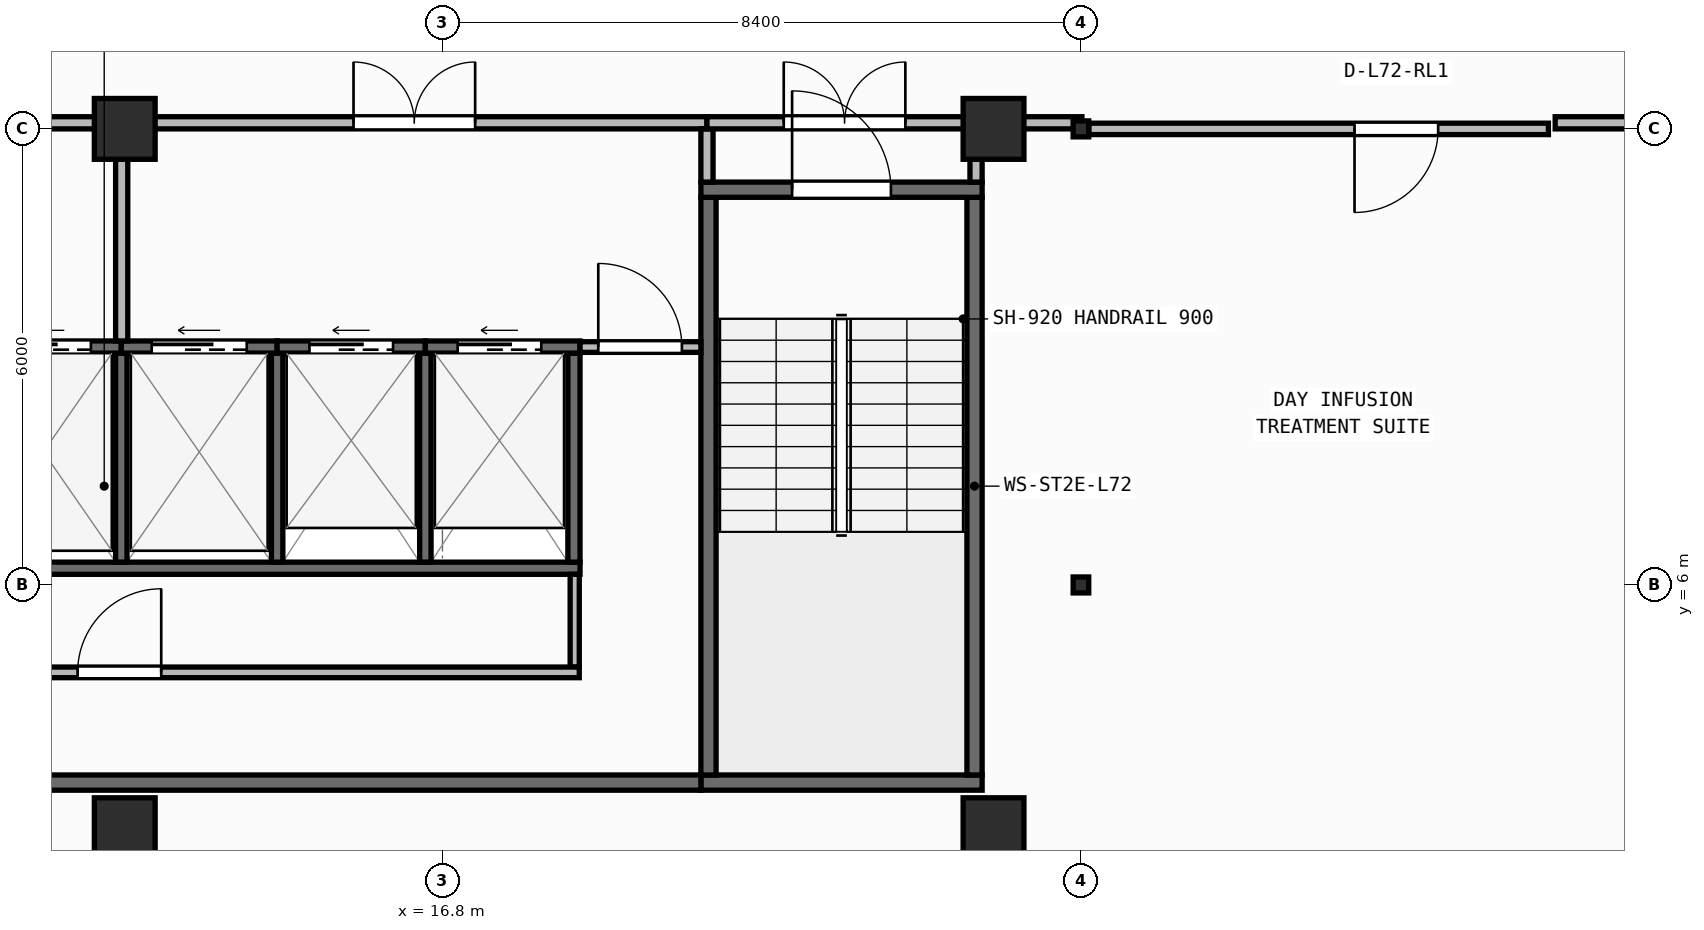
"""IFC4 building model, lengths in metres.
Left out: names, types, materials, properties, quantities, classifications, styles, units other than length and angle.
Written with IfcOpenShell. Run it as: python <this file> out.ifc"""

import sys

from ifc_helpers import new_model, si_unit, direction, frame, frame_2d, origin, origin_2d, place, context, subcontext, project, spatial, rectangle, i_section, extrude, element, fill, save


model = new_model("IFC4")
c1 = context("Model", 3, precision=1e-05, world=origin(), true_north=direction((0.0, 1.0)))
c2 = subcontext(c1, "Body", "Model", "MODEL_VIEW")
j1 = project(units=[si_unit("LENGTHUNIT", "METRE"), si_unit("PLANEANGLEUNIT", "RADIAN")], contexts=[c1])
p1 = place(None, origin())
s1 = spatial("IfcSite", under=j1, at=p1, CompositionType="ELEMENT")
p2 = place(p1, origin())
s2 = spatial("IfcBuilding", under=s1, at=p2, CompositionType="ELEMENT")
p3 = place(p2, frame((0.0, 0.0, 292.1)))
s3 = spatial("IfcBuildingStorey", under=s2, at=p3, CompositionType="ELEMENT", Elevation=292.1)
for number, where, z_axis, x_axis in (
    (1, (12.62, 2.8, 0.0), (0.0, 0.0, 1.0), (1.0, 0.0, 0.0)),
    (2, (24.05, 2.8, 0.0), (0.0, 0.0, 1.0), (1.0, 0.0, 0.0)),
):
    element("IfcColumn", number, at=place(p3, frame(where, z_axis=z_axis, x_axis=x_axis)), inside=s3, PredefinedType="COLUMN", context=c2, shape_type="SweptSolid", body=[
        extrude(rectangle(XDim=0.8, YDim=0.8, at=origin_2d()), origin(), (0.0, 0.0, 1.0), 3.95),
    ])
p4 = place(p3, frame((25.2, 6.0, 0.0), z_axis=(0.0, 0.0, 1.0), x_axis=(1.0, 0.0, 0.0)))
e3 = element("IfcColumn", 3, at=p4, inside=s3, PredefinedType="COLUMN", context=c2, shape_type="SweptSolid", body=[
    extrude(i_section(OverallWidth=0.205, OverallDepth=0.21, WebThickness=0.009, FlangeThickness=0.014, FilletRadius=0.011, at=origin_2d()), origin(), (0.0, 0.0, 1.0), 3.95),
])
for number, where, z_axis, x_axis in (
    (4, (12.62, 12.0, 0.0), (0.0, 0.0, 1.0), (1.0, 0.0, 0.0)),
    (5, (24.05, 12.0, 0.0), (0.0, 0.0, 1.0), (1.0, 0.0, 0.0)),
):
    element("IfcColumn", number, at=place(p3, frame(where, z_axis=z_axis, x_axis=x_axis)), inside=s3, PredefinedType="COLUMN", context=c2, shape_type="SweptSolid", body=[
        extrude(rectangle(XDim=0.8, YDim=0.8, at=origin_2d()), origin(), (0.0, 0.0, 1.0), 3.95),
    ])
p5 = place(p3, frame((25.2, 12.0, 0.0), z_axis=(0.0, 0.0, 1.0), x_axis=(1.0, 0.0, 0.0)))
e6 = element("IfcColumn", 6, at=p5, inside=s3, PredefinedType="COLUMN", context=c2, shape_type="SweptSolid", body=[
    extrude(i_section(OverallWidth=0.205, OverallDepth=0.21, WebThickness=0.009, FlangeThickness=0.014, FilletRadius=0.011, at=origin_2d()), origin(), (0.0, 0.0, 1.0), 3.95),
])
p6 = place(p3, frame((2.46, 0.171, 0.0), z_axis=(0.0, 0.0, 1.0), x_axis=(0.997760665813, 0.066885377746, 0.0)))
e7 = element("IfcWall", 7, at=p6, inside=s3, PredefinedType="STANDARD", context=c2, shape_type="SweptSolid", body=[
    extrude(rectangle(XDim=35.56, YDim=0.26, at=frame_2d((17.78, 0.0))), origin(), (0.0, 0.0, 1.0), 3.71),
])
p7 = place(p6, frame((16.58, 0.0, 0.9)))
e8 = element("IfcOpeningElement", 8, at=p7, cuts=e7, PredefinedType="OPENING", context=c2, shape_type="SweptSolid", body=[
    extrude(rectangle(XDim=2.4, YDim=1.65, at=frame_2d((1.2, 0.825))), frame((0.0, 0.14, 0.0), z_axis=(0.0, -1.0, 0.0), x_axis=(1.0, 0.0, 0.0)), (0.0, 0.0, 1.0), 0.28),
])
p8 = place(p3, frame((20.2, 3.4, 0.0), z_axis=(0.0, 0.0, 1.0), x_axis=(1.0, 0.0, 0.0)))
e9 = element("IfcWall", 9, at=p8, inside=s3, PredefinedType="SHEAR", context=c2, shape_type="SweptSolid", body=[
    extrude(rectangle(XDim=3.7, YDim=0.2, at=frame_2d((1.85, 0.0))), origin(), (0.0, 0.0, 1.0), 3.71),
])
for number, where, z_axis, x_axis in (
    (10, (20.3, 3.5, 0.0), (0.0, 0.0, 1.0), (0.0, 1.0, 0.0)),
    (11, (23.8, 3.5, 0.0), (0.0, 0.0, 1.0), (0.0, 1.0, 0.0)),
):
    element("IfcWall", number, at=place(p3, frame(where, z_axis=z_axis, x_axis=x_axis)), inside=s3, PredefinedType="SHEAR", context=c2, shape_type="SweptSolid", body=[
        extrude(rectangle(XDim=7.6, YDim=0.2, at=frame_2d((3.8, 0.0))), origin(), (0.0, 0.0, 1.0), 3.71),
    ])
p9 = place(p3, frame((20.2, 11.2, 0.0), z_axis=(0.0, 0.0, 1.0), x_axis=(1.0, 0.0, 0.0)))
e12 = element("IfcWall", 12, at=p9, inside=s3, PredefinedType="SHEAR", context=c2, shape_type="SweptSolid", body=[
    extrude(rectangle(XDim=3.7, YDim=0.2, at=frame_2d((1.85, 0.0))), origin(), (0.0, 0.0, 1.0), 3.71),
])
p10 = place(p9, frame((1.2, 0.0, 0.0)))
e13 = element("IfcOpeningElement", 13, at=p10, cuts=e12, PredefinedType="OPENING", context=c2, shape_type="SweptSolid", body=[
    extrude(rectangle(XDim=1.3, YDim=2.15, at=frame_2d((0.65, 1.075))), frame((0.0, 0.11, 0.0), z_axis=(0.0, -1.0, 0.0), x_axis=(1.0, 0.0, 0.0)), (0.0, 0.0, 1.0), 0.22),
])
p11 = place(p3, frame((6.5, 3.4, 0.0), z_axis=(0.0, 0.0, 1.0), x_axis=(1.0, 0.0, 0.0)))
e14 = element("IfcWall", 14, at=p11, inside=s3, PredefinedType="SHEAR", context=c2, shape_type="SweptSolid", body=[
    extrude(rectangle(XDim=13.7, YDim=0.2, at=frame_2d((6.85, 0.0))), origin(), (0.0, 0.0, 1.0), 3.71),
])
p12 = place(p3, frame((6.5, 6.22, 0.0), z_axis=(0.0, 0.0, 1.0), x_axis=(1.0, 0.0, 0.0)))
e15 = element("IfcWall", 15, at=p12, inside=s3, PredefinedType="SHEAR", context=c2, shape_type="SweptSolid", body=[
    extrude(rectangle(XDim=12.11, YDim=0.16, at=frame_2d((6.055, 0.0))), origin(), (0.0, 0.0, 1.0), 3.71),
])
p13 = place(p3, frame((18.53, 6.3, 0.0), z_axis=(0.0, 0.0, 1.0), x_axis=(0.0, 1.0, 0.0)))
e16 = element("IfcWall", 16, at=p13, inside=s3, PredefinedType="SHEAR", context=c2, shape_type="SweptSolid", body=[
    extrude(rectangle(XDim=2.75, YDim=0.16, at=frame_2d((1.375, 0.0))), origin(), (0.0, 0.0, 1.0), 3.71),
])
for number, where, z_axis, x_axis in (
    (17, (12.575, 6.3, 0.0), (0.0, 0.0, 1.0), (0.0, 1.0, 0.0)),
    (18, (14.625, 6.3, 0.0), (0.0, 0.0, 1.0), (0.0, 1.0, 0.0)),
    (19, (16.575, 6.3, 0.0), (0.0, 0.0, 1.0), (0.0, 1.0, 0.0)),
):
    element("IfcWall", number, at=place(p3, frame(where, z_axis=z_axis, x_axis=x_axis)), inside=s3, PredefinedType="SHEAR", context=c2, shape_type="SweptSolid", body=[
        extrude(rectangle(XDim=2.75, YDim=0.15, at=frame_2d((1.375, 0.0))), origin(), (0.0, 0.0, 1.0), 3.71),
    ])
p14 = place(p3, frame((10.525, 9.13, 0.0), z_axis=(0.0, 0.0, 1.0), x_axis=(1.0, 0.0, 0.0)))
e20 = element("IfcWall", 20, at=p14, inside=s3, PredefinedType="SHEAR", context=c2, shape_type="SweptSolid", body=[
    extrude(rectangle(XDim=2.05, YDim=0.16, at=frame_2d((1.025, 0.0))), origin(), (0.0, 0.0, 1.0), 3.71),
])
p15 = place(p14, frame((0.4, 0.0, 0.0)))
e21 = element("IfcOpeningElement", 21, at=p15, cuts=e20, PredefinedType="OPENING", context=c2, shape_type="SweptSolid", body=[
    extrude(rectangle(XDim=1.25, YDim=2.15, at=frame_2d((0.625, 1.075))), frame((0.0, 0.09, 0.0), z_axis=(0.0, -1.0, 0.0), x_axis=(1.0, 0.0, 0.0)), (0.0, 0.0, 1.0), 0.18),
])
p16 = place(p3, frame((12.575, 9.13, 0.0), z_axis=(0.0, 0.0, 1.0), x_axis=(1.0, 0.0, 0.0)))
e22 = element("IfcWall", 22, at=p16, inside=s3, PredefinedType="SHEAR", context=c2, shape_type="SweptSolid", body=[
    extrude(rectangle(XDim=2.05, YDim=0.16, at=frame_2d((1.025, 0.0))), origin(), (0.0, 0.0, 1.0), 3.71),
])
p17 = place(p16, frame((0.4, 0.0, 0.0)))
e23 = element("IfcOpeningElement", 23, at=p17, cuts=e22, PredefinedType="OPENING", context=c2, shape_type="SweptSolid", body=[
    extrude(rectangle(XDim=1.25, YDim=2.15, at=frame_2d((0.625, 1.075))), frame((0.0, 0.09, 0.0), z_axis=(0.0, -1.0, 0.0), x_axis=(1.0, 0.0, 0.0)), (0.0, 0.0, 1.0), 0.18),
])
p18 = place(p3, frame((14.625, 9.13, 0.0), z_axis=(0.0, 0.0, 1.0), x_axis=(1.0, 0.0, 0.0)))
e24 = element("IfcWall", 24, at=p18, inside=s3, PredefinedType="SHEAR", context=c2, shape_type="SweptSolid", body=[
    extrude(rectangle(XDim=1.95, YDim=0.16, at=frame_2d((0.975, 0.0))), origin(), (0.0, 0.0, 1.0), 3.71),
])
p19 = place(p18, frame((0.425, 0.0, 0.0)))
e25 = element("IfcOpeningElement", 25, at=p19, cuts=e24, PredefinedType="OPENING", context=c2, shape_type="SweptSolid", body=[
    extrude(rectangle(XDim=1.1, YDim=2.15, at=frame_2d((0.55, 1.075))), frame((0.0, 0.09, 0.0), z_axis=(0.0, -1.0, 0.0), x_axis=(1.0, 0.0, 0.0)), (0.0, 0.0, 1.0), 0.18),
])
p20 = place(p3, frame((16.575, 9.13, 0.0), z_axis=(0.0, 0.0, 1.0), x_axis=(1.0, 0.0, 0.0)))
e26 = element("IfcWall", 26, at=p20, inside=s3, PredefinedType="SHEAR", context=c2, shape_type="SweptSolid", body=[
    extrude(rectangle(XDim=2.035, YDim=0.16, at=frame_2d((1.018, 0.0))), origin(), (0.0, 0.0, 1.0), 3.71),
])
p21 = place(p20, frame((0.425, 0.0, 0.0)))
e27 = element("IfcOpeningElement", 27, at=p21, cuts=e26, PredefinedType="OPENING", context=c2, shape_type="SweptSolid", body=[
    extrude(rectangle(XDim=1.1, YDim=2.15, at=frame_2d((0.55, 1.075))), frame((0.0, 0.09, 0.0), z_axis=(0.0, -1.0, 0.0), x_axis=(1.0, 0.0, 0.0)), (0.0, 0.0, 1.0), 0.18),
])
p22 = place(p3, frame((18.54, 4.92, 0.0), z_axis=(0.0, 0.0, 1.0), x_axis=(0.0, 1.0, 0.0)))
e28 = element("IfcWall", 28, at=p22, inside=s3, PredefinedType="PARTITIONING", context=c2, shape_type="SweptSolid", body=[
    extrude(rectangle(XDim=1.22, YDim=0.12, at=frame_2d((0.61, 0.0))), origin(), (0.0, 0.0, 1.0), 3.71),
])
p23 = place(p3, frame((6.5, 4.85, 0.0), z_axis=(0.0, 0.0, 1.0), x_axis=(1.0, 0.0, 0.0)))
e29 = element("IfcWall", 29, at=p23, inside=s3, PredefinedType="PARTITIONING", context=c2, shape_type="SweptSolid", body=[
    extrude(rectangle(XDim=12.1, YDim=0.14, at=frame_2d((6.05, 0.0))), origin(), (0.0, 0.0, 1.0), 3.71),
])
p24 = place(p23, frame((5.5, 0.0, 0.0)))
e30 = element("IfcOpeningElement", 30, at=p24, cuts=e29, PredefinedType="OPENING", context=c2, shape_type="SweptSolid", body=[
    extrude(rectangle(XDim=1.1, YDim=2.1, at=frame_2d((0.55, 1.05))), frame((0.0, 0.08, 0.0), z_axis=(0.0, -1.0, 0.0), x_axis=(1.0, 0.0, 0.0)), (0.0, 0.0, 1.0), 0.16),
])
p25 = place(p3, frame((18.61, 9.13, 0.0), z_axis=(0.0, 0.0, 1.0), x_axis=(1.0, 0.0, 0.0)))
e31 = element("IfcWall", 31, at=p25, inside=s3, PredefinedType="PARTITIONING", context=c2, shape_type="SweptSolid", body=[
    extrude(rectangle(XDim=1.59, YDim=0.14, at=frame_2d((0.795, 0.0))), origin(), (0.0, 0.0, 1.0), 3.71),
])
p26 = place(p25, frame((0.24, 0.0, 0.0)))
e32 = element("IfcOpeningElement", 32, at=p26, cuts=e31, PredefinedType="OPENING", context=c2, shape_type="SweptSolid", body=[
    extrude(rectangle(XDim=1.1, YDim=2.1, at=frame_2d((0.55, 1.05))), frame((0.0, 0.08, 0.0), z_axis=(0.0, -1.0, 0.0), x_axis=(1.0, 0.0, 0.0)), (0.0, 0.0, 1.0), 0.16),
])
p27 = place(p3, frame((6.4, 12.08, 0.0), z_axis=(0.0, 0.0, 1.0), x_axis=(1.0, 0.0, 0.0)))
e33 = element("IfcWall", 33, at=p27, inside=s3, PredefinedType="PARTITIONING", context=c2, shape_type="SweptSolid", body=[
    extrude(rectangle(XDim=6.18, YDim=0.16, at=frame_2d((3.09, 0.0))), origin(), (0.0, 0.0, 1.0), 3.157),
])
p28 = place(p27, frame((2.29, 0.0, 0.0)))
e34 = element("IfcOpeningElement", 34, at=p28, cuts=e33, PredefinedType="OPENING", context=c2, shape_type="SweptSolid", body=[
    extrude(rectangle(XDim=1.6, YDim=2.05, at=frame_2d((0.8, 1.025))), frame((0.0, 0.09, 0.0), z_axis=(0.0, -1.0, 0.0), x_axis=(1.0, 0.0, 0.0)), (0.0, 0.0, 1.0), 0.18),
])
p29 = place(p3, frame((12.58, 9.21, 0.0), z_axis=(0.0, 0.0, 1.0), x_axis=(0.0, 1.0, 0.0)))
e35 = element("IfcWall", 35, at=p29, inside=s3, PredefinedType="PARTITIONING", context=c2, shape_type="SweptSolid", body=[
    extrude(rectangle(XDim=2.79, YDim=0.16, at=frame_2d((1.395, 0.0))), origin(), (0.0, 0.0, 1.0), 3.71),
])
p30 = place(p3, frame((12.58, 12.08, 0.0), z_axis=(0.0, 0.0, 1.0), x_axis=(1.0, 0.0, 0.0)))
e36 = element("IfcWall", 36, at=p30, inside=s3, PredefinedType="PARTITIONING", context=c2, shape_type="SweptSolid", body=[
    extrude(rectangle(XDim=7.7, YDim=0.16, at=frame_2d((3.85, 0.0))), origin(), (0.0, 0.0, 1.0), 3.157),
])
p31 = place(p30, frame((3.05, 0.0, 0.0)))
e37 = element("IfcOpeningElement", 37, at=p31, cuts=e36, PredefinedType="OPENING", context=c2, shape_type="SweptSolid", body=[
    extrude(rectangle(XDim=1.6, YDim=2.05, at=frame_2d((0.8, 1.025))), frame((0.0, 0.09, 0.0), z_axis=(0.0, -1.0, 0.0), x_axis=(1.0, 0.0, 0.0)), (0.0, 0.0, 1.0), 0.18),
])
p32 = place(p3, frame((20.28, 11.3, 0.0), z_axis=(0.0, 0.0, 1.0), x_axis=(0.0, 1.0, 0.0)))
e38 = element("IfcWall", 38, at=p32, inside=s3, PredefinedType="PARTITIONING", context=c2, shape_type="SweptSolid", body=[
    extrude(rectangle(XDim=0.7, YDim=0.16, at=frame_2d((0.35, 0.0))), origin(), (0.0, 0.0, 1.0), 3.71),
])
p33 = place(p3, frame((20.28, 12.08, 0.0), z_axis=(0.0, 0.0, 1.0), x_axis=(1.0, 0.0, 0.0)))
e39 = element("IfcWall", 39, at=p33, inside=s3, PredefinedType="PARTITIONING", context=c2, shape_type="SweptSolid", body=[
    extrude(rectangle(XDim=3.62, YDim=0.16, at=frame_2d((1.81, 0.0))), origin(), (0.0, 0.0, 1.0), 3.157),
])
p34 = place(p33, frame((1.01, 0.0, 0.0)))
e40 = element("IfcOpeningElement", 40, at=p34, cuts=e39, PredefinedType="OPENING", context=c2, shape_type="SweptSolid", body=[
    extrude(rectangle(XDim=1.6, YDim=2.05, at=frame_2d((0.8, 1.025))), frame((0.0, 0.09, 0.0), z_axis=(0.0, -1.0, 0.0), x_axis=(1.0, 0.0, 0.0)), (0.0, 0.0, 1.0), 0.18),
])
p35 = place(p3, frame((23.82, 11.3, 0.0), z_axis=(0.0, 0.0, 1.0), x_axis=(0.0, 1.0, 0.0)))
e41 = element("IfcWall", 41, at=p35, inside=s3, PredefinedType="PARTITIONING", context=c2, shape_type="SweptSolid", body=[
    extrude(rectangle(XDim=0.7, YDim=0.16, at=frame_2d((0.35, 0.0))), origin(), (0.0, 0.0, 1.0), 3.71),
])
p36 = place(p3, frame((31.35, 12.0, 0.0), z_axis=(0.0, 0.0, 1.0), x_axis=(-1.0, 0.0, 0.0)))
e42 = element("IfcWall", 42, at=p36, inside=s3, PredefinedType="PARTITIONING", context=c2, shape_type="SweptSolid", body=[
    extrude(rectangle(XDim=6.048, YDim=0.15, at=frame_2d((3.024, 0.0))), origin(), (0.0, 0.0, 1.0), 3.157),
])
p37 = place(p36, frame((1.451, 0.0, 0.0)))
e43 = element("IfcOpeningElement", 43, at=p37, cuts=e42, PredefinedType="OPENING", context=c2, shape_type="SweptSolid", body=[
    extrude(rectangle(XDim=1.1, YDim=2.1, at=frame_2d((0.55, 1.05))), frame((0.0, 0.085, 0.0), z_axis=(0.0, -1.0, 0.0), x_axis=(1.0, 0.0, 0.0)), (0.0, 0.0, 1.0), 0.17),
])
p38 = place(p3, frame((24.02, 12.08, 0.0), z_axis=(0.0, 0.0, 1.0), x_axis=(1.0, 0.0, 0.0)))
e44 = element("IfcWall", 44, at=p38, inside=s3, PredefinedType="PARTITIONING", context=c2, shape_type="SweptSolid", body=[
    extrude(rectangle(XDim=1.193, YDim=0.16, at=frame_2d((0.597, 0.0))), origin(), (0.0, 0.0, 1.0), 3.157),
])
p39 = place(p3, frame((31.439, 12.08, 0.0), z_axis=(0.0, 0.0, 1.0), x_axis=(1.0, 0.0, 0.0)))
e45 = element("IfcWall", 45, at=p39, inside=s3, PredefinedType="PARTITIONING", context=c2, shape_type="SweptSolid", body=[
    extrude(rectangle(XDim=2.174, YDim=0.16, at=frame_2d((1.087, 0.0))), origin(), (0.0, 0.0, 1.0), 3.157),
])
p40 = place(p10, origin())
e46 = element("IfcDoor", 46, at=p40, inside=s3, OperationType="SINGLE_SWING_LEFT", PredefinedType="DOOR", context=c2, shape_type="SweptSolid", body=[
    extrude(rectangle(XDim=1.3, YDim=2.15, at=frame_2d((0.65, 1.075))), frame((0.0, 0.025, 0.0), z_axis=(0.0, -1.0, 0.0), x_axis=(1.0, 0.0, 0.0)), (0.0, 0.0, 1.0), 0.05),
])
fill(e13, e46)
p41 = place(p15, origin())
e47 = element("IfcDoor", 47, at=p41, inside=s3, OperationType="SLIDING_TO_LEFT", PredefinedType="DOOR", context=c2, shape_type="SweptSolid", body=[
    extrude(rectangle(XDim=1.25, YDim=2.15, at=frame_2d((0.625, 1.075))), frame((0.0, 0.025, 0.0), z_axis=(0.0, -1.0, 0.0), x_axis=(1.0, 0.0, 0.0)), (0.0, 0.0, 1.0), 0.05),
])
fill(e21, e47)
p42 = place(p17, origin())
e48 = element("IfcDoor", 48, at=p42, inside=s3, OperationType="SLIDING_TO_LEFT", PredefinedType="DOOR", context=c2, shape_type="SweptSolid", body=[
    extrude(rectangle(XDim=1.25, YDim=2.15, at=frame_2d((0.625, 1.075))), frame((0.0, 0.025, 0.0), z_axis=(0.0, -1.0, 0.0), x_axis=(1.0, 0.0, 0.0)), (0.0, 0.0, 1.0), 0.05),
])
fill(e23, e48)
p43 = place(p19, origin())
e49 = element("IfcDoor", 49, at=p43, inside=s3, OperationType="SLIDING_TO_LEFT", PredefinedType="DOOR", context=c2, shape_type="SweptSolid", body=[
    extrude(rectangle(XDim=1.1, YDim=2.15, at=frame_2d((0.55, 1.075))), frame((0.0, 0.025, 0.0), z_axis=(0.0, -1.0, 0.0), x_axis=(1.0, 0.0, 0.0)), (0.0, 0.0, 1.0), 0.05),
])
fill(e25, e49)
p44 = place(p21, origin())
e50 = element("IfcDoor", 50, at=p44, inside=s3, OperationType="SLIDING_TO_LEFT", PredefinedType="DOOR", context=c2, shape_type="SweptSolid", body=[
    extrude(rectangle(XDim=1.1, YDim=2.15, at=frame_2d((0.55, 1.075))), frame((0.0, 0.025, 0.0), z_axis=(0.0, -1.0, 0.0), x_axis=(1.0, 0.0, 0.0)), (0.0, 0.0, 1.0), 0.05),
])
fill(e27, e50)
p45 = place(p24, origin())
e51 = element("IfcDoor", 51, at=p45, inside=s3, OperationType="SINGLE_SWING_RIGHT", PredefinedType="DOOR", context=c2, shape_type="SweptSolid", body=[
    extrude(rectangle(XDim=1.1, YDim=2.1, at=frame_2d((0.55, 1.05))), frame((0.0, 0.025, 0.0), z_axis=(0.0, -1.0, 0.0), x_axis=(1.0, 0.0, 0.0)), (0.0, 0.0, 1.0), 0.05),
])
fill(e30, e51)
p46 = place(p26, origin())
e52 = element("IfcDoor", 52, at=p46, inside=s3, OperationType="SINGLE_SWING_LEFT", PredefinedType="DOOR", context=c2, shape_type="SweptSolid", body=[
    extrude(rectangle(XDim=1.1, YDim=2.1, at=frame_2d((0.55, 1.05))), frame((0.0, 0.025, 0.0), z_axis=(0.0, -1.0, 0.0), x_axis=(1.0, 0.0, 0.0)), (0.0, 0.0, 1.0), 0.05),
])
fill(e32, e52)
p47 = place(p31, origin())
e53 = element("IfcDoor", 53, at=p47, inside=s3, OperationType="DOUBLE_DOOR_SINGLE_SWING", PredefinedType="DOOR", context=c2, shape_type="SweptSolid", body=[
    extrude(rectangle(XDim=1.6, YDim=2.05, at=frame_2d((0.8, 1.025))), frame((0.0, 0.025, 0.0), z_axis=(0.0, -1.0, 0.0), x_axis=(1.0, 0.0, 0.0)), (0.0, 0.0, 1.0), 0.05),
])
fill(e37, e53)
p48 = place(p34, origin())
e54 = element("IfcDoor", 54, at=p48, inside=s3, OperationType="DOUBLE_DOOR_SINGLE_SWING", PredefinedType="DOOR", context=c2, shape_type="SweptSolid", body=[
    extrude(rectangle(XDim=1.6, YDim=2.05, at=frame_2d((0.8, 1.025))), frame((0.0, 0.025, 0.0), z_axis=(0.0, -1.0, 0.0), x_axis=(1.0, 0.0, 0.0)), (0.0, 0.0, 1.0), 0.05),
])
fill(e40, e54)
p49 = place(p37, origin())
e55 = element("IfcDoor", 55, at=p49, inside=s3, OperationType="SINGLE_SWING_RIGHT", PredefinedType="DOOR", context=c2, shape_type="SweptSolid", body=[
    extrude(rectangle(XDim=1.1, YDim=2.1, at=frame_2d((0.55, 1.05))), frame((0.0, 0.025, 0.0), z_axis=(0.0, -1.0, 0.0), x_axis=(1.0, 0.0, 0.0)), (0.0, 0.0, 1.0), 0.05),
])
fill(e43, e55)
save(model, sys.argv[1])
